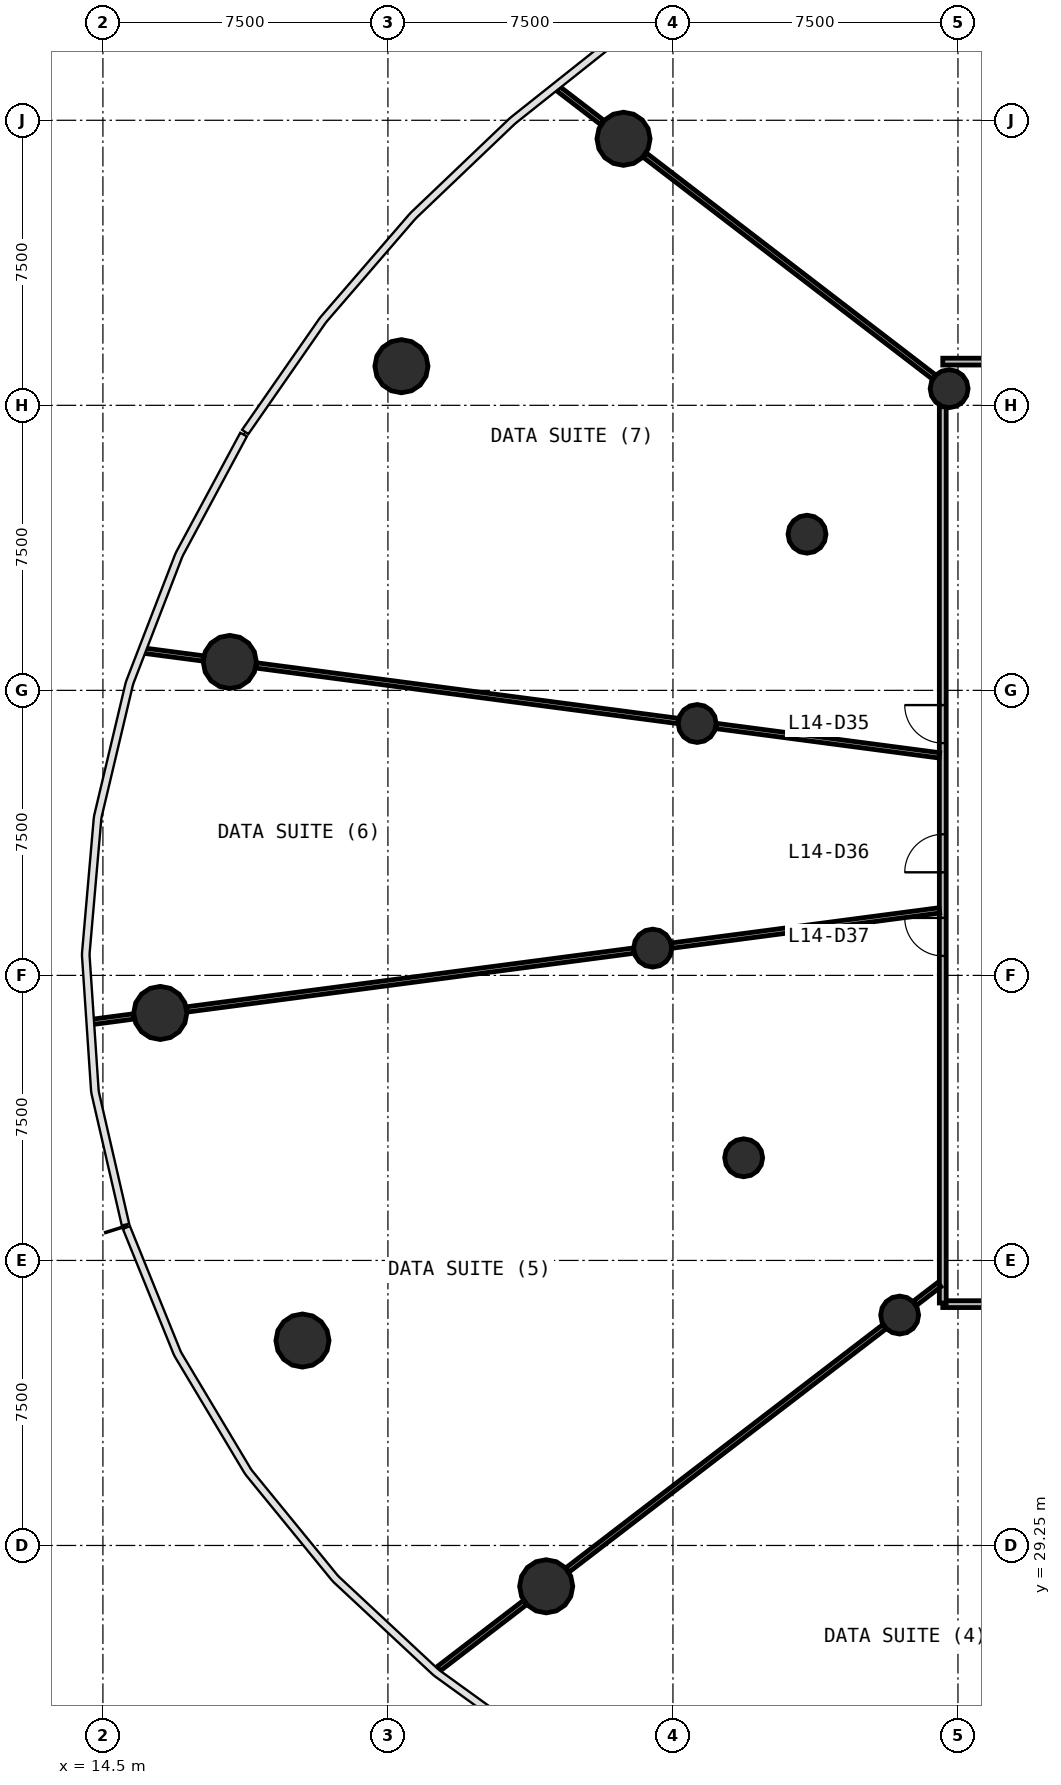
"""IFC4 building model, lengths in metres.
Left out: names, types, materials, properties, quantities, classifications, styles, units other than length and angle.
Written with IfcOpenShell. Run it as: python <this file> out.ifc"""

import sys

from ifc_helpers import new_model, si_unit, direction, frame, frame_2d, origin, origin_2d, place, context, subcontext, project, spatial, rectangle, circle, extrude, source, transform, mapped, element, fill, save


model = new_model("IFC4")
c1 = context("Model", 3, precision=1e-05, world=origin(), true_north=direction((0.0, 1.0)))
c2 = subcontext(c1, "Body", "Model", "MODEL_VIEW")
j1 = project(units=[si_unit("LENGTHUNIT", "METRE"), si_unit("PLANEANGLEUNIT", "RADIAN")], contexts=[c1])
p1 = place(None, origin())
s1 = spatial("IfcSite", under=j1, at=p1, CompositionType="ELEMENT")
p2 = place(p1, origin())
s2 = spatial("IfcBuilding", under=s1, at=p2, CompositionType="ELEMENT")
p3 = place(p2, frame((0.0, 0.0, 62.2)))
s3 = spatial("IfcBuildingStorey", under=s2, at=p3, CompositionType="ELEMENT", Elevation=62.2)
m1 = source(origin(), c2, "Body", "SweptSolid", [
    extrude(circle(Radius=0.7, at=origin_2d()), origin(), (0.0, 0.0, 1.0), 4.4),
])
for number, where, z_axis, x_axis in (
    (1, (28.199, 66.263, 0.0), (0.0, 0.0, 1.0), (1.0, 0.0, 0.0)),
    (2, (22.355, 60.279, 0.0), (0.0, 0.0, 1.0), (1.0, 0.0, 0.0)),
    (3, (17.839, 52.497, 0.0), (0.0, 0.0, 1.0), (1.0, 0.0, 0.0)),
    (4, (16.01, 43.262, 0.0), (0.0, 0.0, 1.0), (1.0, 0.0, 0.0)),
    (5, (19.751, 34.642, 0.0), (0.0, 0.0, 1.0), (1.0, 0.0, 0.0)),
    (6, (26.164, 28.176, 0.0), (0.0, 0.0, 1.0), (1.0, 0.0, 0.0)),
):
    element("IfcColumn", number, at=place(p3, frame(where, z_axis=z_axis, x_axis=x_axis)), inside=s3, PredefinedType="COLUMN", context=c2, shape_type="MappedRepresentation", body=[
        mapped(m1, transform((0.0, 0.0, 0.0), scale=1.0)),
    ])
m2 = source(origin(), c2, "Body", "SweptSolid", [
    extrude(circle(Radius=0.5, at=origin_2d()), origin(), (0.0, 0.0, 1.0), 4.4),
])
for number, where, z_axis, x_axis in (
    (7, (36.768, 59.688, 0.0), (0.0, 0.0, 1.0), (1.0, 0.0, 0.0)),
    (8, (33.028, 55.859, 0.0), (0.0, 0.0, 1.0), (1.0, 0.0, 0.0)),
    (9, (30.137, 50.878, 0.0), (0.0, 0.0, 1.0), (1.0, 0.0, 0.0)),
    (10, (28.966, 44.968, 0.0), (0.0, 0.0, 1.0), (1.0, 0.0, 0.0)),
    (11, (31.361, 39.451, 0.0), (0.0, 0.0, 1.0), (1.0, 0.0, 0.0)),
    (12, (35.465, 35.312, 0.0), (0.0, 0.0, 1.0), (1.0, 0.0, 0.0)),
):
    element("IfcColumn", number, at=place(p3, frame(where, z_axis=z_axis, x_axis=x_axis)), inside=s3, PredefinedType="COLUMN", context=c2, shape_type="MappedRepresentation", body=[
        mapped(m2, transform((0.0, 0.0, 0.0), scale=1.0)),
    ])
p4 = place(p3, frame((67.4, 35.6, 0.0), z_axis=(0.0, 0.0, 1.0), x_axis=(-1.0, 0.0, 0.0)))
e13 = element("IfcWall", 13, at=p4, inside=s3, PredefinedType="PARTITIONING", context=c2, shape_type="SweptSolid", body=[
    extrude(rectangle(XDim=30.8, YDim=0.18, at=frame_2d((15.4, 0.0))), origin(), (0.0, 0.0, 1.0), 3.05),
])
p5 = place(p4, frame((9.05, 0.0, 0.0)))
e14 = element("IfcOpeningElement", 14, at=p5, cuts=e13, PredefinedType="OPENING", context=c2, shape_type="SweptSolid", body=[
    extrude(rectangle(XDim=0.9, YDim=2.1, at=frame_2d((0.45, 1.05))), frame((0.0, 0.1, 0.0), z_axis=(0.0, -1.0, 0.0), x_axis=(1.0, 0.0, 0.0)), (0.0, 0.0, 1.0), 0.2),
])
p6 = place(p4, frame((6.05, 0.0, 0.0)))
e15 = element("IfcOpeningElement", 15, at=p6, cuts=e13, PredefinedType="OPENING", context=c2, shape_type="SweptSolid", body=[
    extrude(rectangle(XDim=0.9, YDim=2.1, at=frame_2d((0.45, 1.05))), frame((0.0, 0.1, 0.0), z_axis=(0.0, -1.0, 0.0), x_axis=(1.0, 0.0, 0.0)), (0.0, 0.0, 1.0), 0.2),
])
p7 = place(p4, frame((2.45, 0.0, 0.0)))
e16 = element("IfcOpeningElement", 16, at=p7, cuts=e13, PredefinedType="OPENING", context=c2, shape_type="SweptSolid", body=[
    extrude(rectangle(XDim=0.9, YDim=2.1, at=frame_2d((0.45, 1.05))), frame((0.0, 0.1, 0.0), z_axis=(0.0, -1.0, 0.0), x_axis=(1.0, 0.0, 0.0)), (0.0, 0.0, 1.0), 0.2),
])
p8 = place(p4, frame((20.95, 0.0, 0.0)))
e17 = element("IfcOpeningElement", 17, at=p8, cuts=e13, PredefinedType="OPENING", context=c2, shape_type="SweptSolid", body=[
    extrude(rectangle(XDim=1.0, YDim=2.1, at=frame_2d((0.5, 1.05))), frame((0.0, 0.1, 0.0), z_axis=(0.0, -1.0, 0.0), x_axis=(1.0, 0.0, 0.0)), (0.0, 0.0, 1.0), 0.2),
])
p9 = place(p4, frame((14.95, 0.0, 0.0)))
e18 = element("IfcOpeningElement", 18, at=p9, cuts=e13, PredefinedType="OPENING", context=c2, shape_type="SweptSolid", body=[
    extrude(rectangle(XDim=1.0, YDim=2.1, at=frame_2d((0.5, 1.05))), frame((0.0, 0.1, 0.0), z_axis=(0.0, -1.0, 0.0), x_axis=(1.0, 0.0, 0.0)), (0.0, 0.0, 1.0), 0.2),
])
p10 = place(p4, frame((12.55, 0.0, 0.0)))
e19 = element("IfcOpeningElement", 19, at=p10, cuts=e13, PredefinedType="OPENING", context=c2, shape_type="SweptSolid", body=[
    extrude(rectangle(XDim=1.0, YDim=2.1, at=frame_2d((0.5, 1.05))), frame((0.0, 0.1, 0.0), z_axis=(0.0, -1.0, 0.0), x_axis=(1.0, 0.0, 0.0)), (0.0, 0.0, 1.0), 0.2),
])
p11 = place(p3, frame((36.6, 60.4, 0.0), z_axis=(0.0, 0.0, 1.0), x_axis=(1.0, 0.0, 0.0)))
e20 = element("IfcWall", 20, at=p11, inside=s3, PredefinedType="PARTITIONING", context=c2, shape_type="SweptSolid", body=[
    extrude(rectangle(XDim=30.8, YDim=0.18, at=frame_2d((15.4, 0.0))), origin(), (0.0, 0.0, 1.0), 3.05),
])
p12 = place(p11, frame((17.35, 0.0, 0.0)))
e21 = element("IfcOpeningElement", 21, at=p12, cuts=e20, PredefinedType="OPENING", context=c2, shape_type="SweptSolid", body=[
    extrude(rectangle(XDim=1.0, YDim=2.1, at=frame_2d((0.5, 1.05))), frame((0.0, 0.1, 0.0), z_axis=(0.0, -1.0, 0.0), x_axis=(1.0, 0.0, 0.0)), (0.0, 0.0, 1.0), 0.2),
])
p13 = place(p11, frame((14.95, 0.0, 0.0)))
e22 = element("IfcOpeningElement", 22, at=p13, cuts=e20, PredefinedType="OPENING", context=c2, shape_type="SweptSolid", body=[
    extrude(rectangle(XDim=1.0, YDim=2.1, at=frame_2d((0.5, 1.05))), frame((0.0, 0.1, 0.0), z_axis=(0.0, -1.0, 0.0), x_axis=(1.0, 0.0, 0.0)), (0.0, 0.0, 1.0), 0.2),
])
p14 = place(p3, frame((36.6, 35.63, 0.0), z_axis=(0.0, 0.0, 1.0), x_axis=(0.0, 1.0, 0.0)))
e23 = element("IfcWall", 23, at=p14, inside=s3, PredefinedType="PARTITIONING", context=c2, shape_type="SweptSolid", body=[
    extrude(rectangle(XDim=23.583, YDim=0.18, at=frame_2d((11.791, 0.0))), origin(), (0.0, 0.0, 1.0), 3.05),
])
p15 = place(p14, frame((14.732, 0.0, 0.0)))
e24 = element("IfcOpeningElement", 24, at=p15, cuts=e23, PredefinedType="OPENING", context=c2, shape_type="SweptSolid", body=[
    extrude(rectangle(XDim=1.0, YDim=2.1, at=frame_2d((0.5, 1.05))), frame((0.0, 0.1, 0.0), z_axis=(0.0, -1.0, 0.0), x_axis=(1.0, 0.0, 0.0)), (0.0, 0.0, 1.0), 0.2),
])
p16 = place(p14, frame((11.333, 0.0, 0.0)))
e25 = element("IfcOpeningElement", 25, at=p16, cuts=e23, PredefinedType="OPENING", context=c2, shape_type="SweptSolid", body=[
    extrude(rectangle(XDim=1.0, YDim=2.1, at=frame_2d((0.5, 1.05))), frame((0.0, 0.1, 0.0), z_axis=(0.0, -1.0, 0.0), x_axis=(1.0, 0.0, 0.0)), (0.0, 0.0, 1.0), 0.2),
])
p17 = place(p14, frame((9.133, 0.0, 0.0)))
e26 = element("IfcOpeningElement", 26, at=p17, cuts=e23, PredefinedType="OPENING", context=c2, shape_type="SweptSolid", body=[
    extrude(rectangle(XDim=1.0, YDim=2.1, at=frame_2d((0.5, 1.05))), frame((0.0, 0.1, 0.0), z_axis=(0.0, -1.0, 0.0), x_axis=(1.0, 0.0, 0.0)), (0.0, 0.0, 1.0), 0.2),
])
p18 = place(p3, frame((28.466, 44.902, 0.0), z_axis=(0.0, 0.0, 1.0), x_axis=(-0.991446586451, -0.130513088287, 0.0)))
e27 = element("IfcWall", 27, at=p18, inside=s3, PredefinedType="PARTITIONING", context=c2, shape_type="SweptSolid", body=[
    extrude(rectangle(XDim=11.86, YDim=0.14, at=frame_2d((5.93, 0.0))), origin(), (0.0, 0.0, 1.0), 3.05),
])
p19 = place(p3, frame((29.637, 50.944, 0.0), z_axis=(0.0, 0.0, 1.0), x_axis=(-0.991443306772, 0.130538000051, 0.0)))
e28 = element("IfcWall", 28, at=p19, inside=s3, PredefinedType="PARTITIONING", context=c2, shape_type="SweptSolid", body=[
    extrude(rectangle(XDim=11.195, YDim=0.14, at=frame_2d((5.598, 0.0))), origin(), (0.0, 0.0, 1.0), 3.05),
])
p20 = place(p3, frame((35.065, 35.005, 0.0), z_axis=(0.0, 0.0, 1.0), x_axis=(-0.793353660174, -0.608761012129, 0.0)))
e29 = element("IfcWall", 29, at=p20, inside=s3, PredefinedType="PARTITIONING", context=c2, shape_type="SweptSolid", body=[
    extrude(rectangle(XDim=10.515, YDim=0.14, at=frame_2d((5.257, 0.0))), origin(), (0.0, 0.0, 1.0), 3.05),
])
p21 = place(p3, frame((36.367, 59.995, 0.0), z_axis=(0.0, 0.0, 1.0), x_axis=(-0.793366218398, 0.608744645566, 0.0)))
e30 = element("IfcWall", 30, at=p21, inside=s3, PredefinedType="PARTITIONING", context=c2, shape_type="SweptSolid", body=[
    extrude(rectangle(XDim=9.591, YDim=0.14, at=frame_2d((4.796, 0.0))), origin(), (0.0, 0.0, 1.0), 3.05),
])
p22 = place(p3, frame((36.51, 45.961, 0.0), z_axis=(0.0, 0.0, 1.0), x_axis=(-0.99144622305, -0.130515848849, 0.0)))
e31 = element("IfcWall", 31, at=p22, inside=s3, PredefinedType="PARTITIONING", context=c2, shape_type="SweptSolid", body=[
    extrude(rectangle(XDim=7.104, YDim=0.14, at=frame_2d((3.552, 0.0))), origin(), (0.0, 0.0, 1.0), 3.05),
])
p23 = place(p3, frame((36.51, 50.039, 0.0), z_axis=(0.0, 0.0, 1.0), x_axis=(-0.991445034615, 0.130524876315, 0.0)))
e32 = element("IfcWall", 32, at=p23, inside=s3, PredefinedType="PARTITIONING", context=c2, shape_type="SweptSolid", body=[
    extrude(rectangle(XDim=5.924, YDim=0.14, at=frame_2d((2.962, 0.0))), origin(), (0.0, 0.0, 1.0), 3.05),
])
p24 = place(p3, frame((25.606, 27.747, 0.0), z_axis=(0.0, 0.0, 1.0), x_axis=(-0.793354252031, -0.608760240804, 0.0)))
e33 = element("IfcWall", 33, at=p24, inside=s3, PredefinedType="PARTITIONING", context=c2, shape_type="SweptSolid", body=[
    extrude(rectangle(XDim=2.869, YDim=0.14, at=frame_2d((1.434, 0.0))), origin(), (0.0, 0.0, 1.0), 3.05),
])
p25 = place(p3, frame((17.141, 52.589, 0.0), z_axis=(0.0, 0.0, 1.0), x_axis=(-0.991448422008, 0.130499143666, 0.0)))
e34 = element("IfcWall", 34, at=p25, inside=s3, PredefinedType="PARTITIONING", context=c2, shape_type="SweptSolid", body=[
    extrude(rectangle(XDim=1.557, YDim=0.14, at=frame_2d((0.778, 0.0))), origin(), (0.0, 0.0, 1.0), 3.05),
])
p26 = place(p3, frame((27.641, 66.691, 0.0), z_axis=(0.0, 0.0, 1.0), x_axis=(-0.793275855942, 0.608862395274, 0.0)))
e35 = element("IfcWall", 35, at=p26, inside=s3, PredefinedType="PARTITIONING", context=c2, shape_type="SweptSolid", body=[
    extrude(rectangle(XDim=1.475, YDim=0.14, at=frame_2d((0.737, 0.0))), origin(), (0.0, 0.0, 1.0), 3.05),
])
p27 = place(p3, frame((15.311, 43.17, 0.0), z_axis=(0.0, 0.0, 1.0), x_axis=(-0.991440869664, -0.130556508687, 0.0)))
e36 = element("IfcWall", 36, at=p27, inside=s3, PredefinedType="PARTITIONING", context=c2, shape_type="SweptSolid", body=[
    extrude(rectangle(XDim=1.115, YDim=0.14, at=frame_2d((0.557, 0.0))), origin(), (0.0, 0.0, 1.0), 3.05),
])
p28 = place(p3, frame((36.51, 36.114, 0.0), z_axis=(0.0, 0.0, 1.0), x_axis=(-0.793316076519, -0.608809989025, 0.0)))
e37 = element("IfcWall", 37, at=p28, inside=s3, PredefinedType="PARTITIONING", context=c2, shape_type="SweptSolid", body=[
    extrude(rectangle(XDim=0.812, YDim=0.14, at=frame_2d((0.406, 0.0))), origin(), (0.0, 0.0, 1.0), 3.05),
])
m3 = source(origin(), c2, "Body", "SweptSolid", [
    extrude(rectangle(XDim=1.0, YDim=2.1, at=frame_2d((0.5, 1.05))), frame((0.0, 0.025, 0.0), z_axis=(0.0, -1.0, 0.0), x_axis=(1.0, 0.0, 0.0)), (0.0, 0.0, 1.0), 0.05),
])
p29 = place(p15, origin())
e38 = element("IfcDoor", 38, at=p29, inside=s3, OperationType="SINGLE_SWING_RIGHT", PredefinedType="DOOR", context=c2, shape_type="MappedRepresentation", body=[
    mapped(m3, transform((0.0, 0.0, 0.0), scale=1.0)),
])
fill(e24, e38)
p30 = place(p16, origin())
e39 = element("IfcDoor", 39, at=p30, inside=s3, OperationType="SINGLE_SWING_LEFT", PredefinedType="DOOR", context=c2, shape_type="MappedRepresentation", body=[
    mapped(m3, transform((0.0, 0.0, 0.0), scale=1.0)),
])
fill(e25, e39)
p31 = place(p17, origin())
e40 = element("IfcDoor", 40, at=p31, inside=s3, OperationType="SINGLE_SWING_RIGHT", PredefinedType="DOOR", context=c2, shape_type="MappedRepresentation", body=[
    mapped(m3, transform((0.0, 0.0, 0.0), scale=1.0)),
])
fill(e26, e40)
save(model, sys.argv[1])
